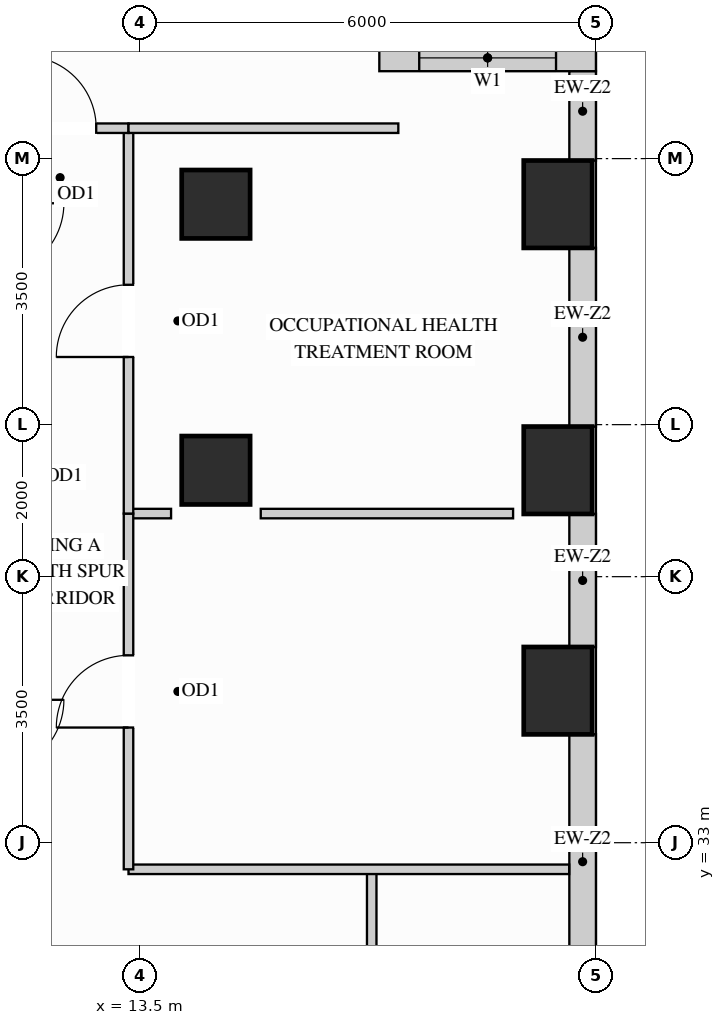
"""IFC4 building model, lengths in metres.
Left out: names, types, materials, properties, quantities, classifications, styles, units other than length and angle.
Written with IfcOpenShell. Run it as: python <this file> out.ifc"""

import sys

from ifc_helpers import new_model, si_unit, direction, frame, frame_2d, origin, origin_2d, place, context, subcontext, project, spatial, rectangle, extrude, source, transform, mapped, element, fill, save


model = new_model("IFC4")
c1 = context("Model", 3, precision=1e-05, world=origin(), true_north=direction((0.0, 1.0)))
c2 = subcontext(c1, "Body", "Model", "MODEL_VIEW")
j1 = project(units=[si_unit("LENGTHUNIT", "METRE"), si_unit("PLANEANGLEUNIT", "RADIAN")], contexts=[c1])
p1 = place(None, origin())
s1 = spatial("IfcSite", under=j1, at=p1, CompositionType="ELEMENT")
p2 = place(p1, origin())
s2 = spatial("IfcBuilding", under=s1, at=p2, CompositionType="ELEMENT")
p3 = place(p2, frame((0.0, 0.0, 91.8)))
s3 = spatial("IfcBuildingStorey", under=s2, at=p3, CompositionType="ELEMENT", Elevation=91.8)
m1 = source(origin(), c2, "Body", "SweptSolid", [
    extrude(rectangle(XDim=0.9, YDim=0.9, at=origin_2d()), origin(), (0.0, 0.0, 1.0), 3.38),
])
for number, where, z_axis, x_axis in (
    (1, (14.5, 37.9, 0.0), (0.0, 0.0, 1.0), (1.0, 0.0, 0.0)),
    (2, (14.5, 41.4, 0.0), (0.0, 0.0, 1.0), (1.0, 0.0, 0.0)),
):
    element("IfcColumn", number, at=place(p3, frame(where, z_axis=z_axis, x_axis=x_axis)), inside=s3, PredefinedType="COLUMN", context=c2, shape_type="MappedRepresentation", body=[
        mapped(m1, transform((0.0, 0.0, 0.0), x_axis=(1.0, 0.0, 0.0), y_axis=(0.0, 1.0, 0.0), z_axis=(0.0, 0.0, 1.0))),
    ])
m2 = source(origin(), c2, "Body", "SweptSolid", [
    extrude(rectangle(XDim=0.9, YDim=1.15, at=origin_2d()), origin(), (0.0, 0.0, 1.0), 3.38),
])
for number, where, z_axis, x_axis in (
    (3, (19.0, 35.0, 0.0), (0.0, 0.0, 1.0), (1.0, 0.0, 0.0)),
    (4, (19.0, 37.9, 0.0), (0.0, 0.0, 1.0), (1.0, 0.0, 0.0)),
    (5, (19.0, 41.4, 0.0), (0.0, 0.0, 1.0), (1.0, 0.0, 0.0)),
):
    element("IfcColumn", number, at=place(p3, frame(where, z_axis=z_axis, x_axis=x_axis)), inside=s3, PredefinedType="COLUMN", context=c2, shape_type="MappedRepresentation", body=[
        mapped(m2, transform((0.0, 0.0, 0.0), x_axis=(1.0, 0.0, 0.0), y_axis=(0.0, 1.0, 0.0), z_axis=(0.0, 0.0, 1.0))),
    ])
m3 = source(origin(), c2, "Body", "SweptSolid", [
    extrude(rectangle(XDim=3.354, YDim=0.35, at=frame_2d((1.677, 0.0))), origin(), (0.0, 0.0, 1.0), 2.519),
])
p4 = place(p3, frame((19.325, 31.073, 0.0), z_axis=(0.0, 0.0, 1.0), x_axis=(0.0, 1.0, 0.0)))
e6 = element("IfcWall", 6, at=p4, inside=s3, PredefinedType="SOLIDWALL", context=c2, shape_type="MappedRepresentation", body=[
    mapped(m3, transform((0.0, 0.0, 0.0), x_axis=(1.0, 0.0, 0.0), y_axis=(0.0, 1.0, 0.0), z_axis=(0.0, 0.0, 1.0))),
])
m4 = source(origin(), c2, "Body", "SweptSolid", [
    extrude(rectangle(XDim=1.754, YDim=0.35, at=frame_2d((0.877, 0.0))), origin(), (0.0, 0.0, 1.0), 2.519),
])
p5 = place(p3, frame((19.325, 35.573, 0.0), z_axis=(0.0, 0.0, 1.0), x_axis=(0.0, 1.0, 0.0)))
e7 = element("IfcWall", 7, at=p5, inside=s3, PredefinedType="SOLIDWALL", context=c2, shape_type="MappedRepresentation", body=[
    mapped(m4, transform((0.0, 0.0, 0.0), x_axis=(1.0, 0.0, 0.0), y_axis=(0.0, 1.0, 0.0), z_axis=(0.0, 0.0, 1.0))),
])
m5 = source(origin(), c2, "Body", "SweptSolid", [
    extrude(rectangle(XDim=2.354, YDim=0.35, at=frame_2d((1.177, 0.0))), origin(), (0.0, 0.0, 1.0), 2.519),
])
p6 = place(p3, frame((19.325, 38.473, 0.0), z_axis=(0.0, 0.0, 1.0), x_axis=(0.0, 1.0, 0.0)))
e8 = element("IfcWall", 8, at=p6, inside=s3, PredefinedType="SOLIDWALL", context=c2, shape_type="MappedRepresentation", body=[
    mapped(m5, transform((0.0, 0.0, 0.0), x_axis=(1.0, 0.0, 0.0), y_axis=(0.0, 1.0, 0.0), z_axis=(0.0, 0.0, 1.0))),
])
m6 = source(origin(), c2, "Body", "SweptSolid", [
    extrude(rectangle(XDim=1.179, YDim=0.35, at=frame_2d((0.59, 0.0))), origin(), (0.0, 0.0, 1.0), 3.365),
])
p7 = place(p3, frame((19.325, 41.973, 0.0), z_axis=(0.0, 0.0, 1.0), x_axis=(0.0, 1.0, 0.0)))
e9 = element("IfcWall", 9, at=p7, inside=s3, PredefinedType="SOLIDWALL", context=c2, shape_type="MappedRepresentation", body=[
    mapped(m6, transform((0.0, 0.0, 0.0), x_axis=(1.0, 0.0, 0.0), y_axis=(0.0, 1.0, 0.0), z_axis=(0.0, 0.0, 1.0))),
])
p8 = place(p3, frame((19.5, 43.325, 0.0), z_axis=(0.0, 0.0, 1.0), x_axis=(-1.0, 0.0, 0.0)))
e10 = element("IfcWall", 10, at=p8, inside=s3, PredefinedType="SOLIDWALL", context=c2, shape_type="SweptSolid", body=[
    extrude(rectangle(XDim=2.85, YDim=0.35, at=frame_2d((1.425, 0.0))), origin(), (0.0, 0.0, 1.0), 3.365),
])
p9 = place(p8, frame((0.525, 0.0, 0.78)))
e11 = element("IfcOpeningElement", 11, at=p9, cuts=e10, PredefinedType="OPENING", context=c2, shape_type="SweptSolid", body=[
    extrude(rectangle(XDim=1.8, YDim=2.1, at=frame_2d((0.9, 1.05))), frame((0.0, 0.185, 0.0), z_axis=(0.0, -1.0, 0.0), x_axis=(1.0, 0.0, 0.0)), (0.0, 0.0, 1.0), 0.37),
])
p10 = place(p3, frame((16.55, 26.05, 0.0), z_axis=(0.0, 0.0, 1.0), x_axis=(0.0, 1.0, 0.0)))
e12 = element("IfcWall", 12, at=p10, inside=s3, PredefinedType="PARTITIONING", context=c2, shape_type="SweptSolid", body=[
    extrude(rectangle(XDim=6.6, YDim=0.125, at=frame_2d((3.3, 0.0))), origin(), (0.0, 0.0, 1.0), 3.365),
])
p11 = place(p10, frame((2.825, 0.0, 0.0)))
e13 = element("IfcOpeningElement", 13, at=p11, cuts=e12, PredefinedType="OPENING", context=c2, shape_type="SweptSolid", body=[
    extrude(rectangle(XDim=0.95, YDim=2.15, at=frame_2d((0.475, 1.075))), frame((0.0, 0.073, 0.0), z_axis=(0.0, -1.0, 0.0), x_axis=(1.0, 0.0, 0.0)), (0.0, 0.0, 1.0), 0.145),
])
m7 = source(origin(), c2, "Body", "SweptSolid", [
    extrude(rectangle(XDim=0.56, YDim=0.125, at=frame_2d((0.28, 0.0))), origin(), (0.0, 0.0, 1.0), 3.365),
])
p12 = place(p3, frame((13.35, 37.33, 0.0), z_axis=(0.0, 0.0, 1.0), x_axis=(1.0, 0.0, 0.0)))
e14 = element("IfcWall", 14, at=p12, inside=s3, PredefinedType="PARTITIONING", context=c2, shape_type="MappedRepresentation", body=[
    mapped(m7, transform((0.0, 0.0, 0.0), x_axis=(1.0, 0.0, 0.0), y_axis=(0.0, 1.0, 0.0), z_axis=(0.0, 0.0, 1.0))),
])
m8 = source(origin(), c2, "Body", "SweptSolid", [
    extrude(rectangle(XDim=3.32, YDim=0.125, at=frame_2d((1.66, 0.0))), origin(), (0.0, 0.0, 1.0), 3.365),
])
p13 = place(p3, frame((15.09, 37.33, 0.0), z_axis=(0.0, 0.0, 1.0), x_axis=(1.0, 0.0, 0.0)))
e15 = element("IfcWall", 15, at=p13, inside=s3, PredefinedType="PARTITIONING", context=c2, shape_type="MappedRepresentation", body=[
    mapped(m8, transform((0.0, 0.0, 0.0), x_axis=(1.0, 0.0, 0.0), y_axis=(0.0, 1.0, 0.0), z_axis=(0.0, 0.0, 1.0))),
])
m9 = source(origin(), c2, "Body", "SweptSolid", [
    extrude(rectangle(XDim=5.798, YDim=0.125, at=frame_2d((2.899, 0.0))), origin(), (0.0, 0.0, 1.0), 3.365),
])
p14 = place(p3, frame((13.35, 32.65, 0.0), z_axis=(0.0, 0.0, 1.0), x_axis=(1.0, 0.0, 0.0)))
e16 = element("IfcWall", 16, at=p14, inside=s3, PredefinedType="PARTITIONING", context=c2, shape_type="MappedRepresentation", body=[
    mapped(m9, transform((0.0, 0.0, 0.0), x_axis=(1.0, 0.0, 0.0), y_axis=(0.0, 1.0, 0.0), z_axis=(0.0, 0.0, 1.0))),
])
p15 = place(p3, frame((13.35, 32.65, 0.0), z_axis=(0.0, 0.0, 1.0), x_axis=(0.0, 1.0, 0.0)))
e17 = element("IfcWall", 17, at=p15, inside=s3, PredefinedType="PARTITIONING", context=c2, shape_type="SweptSolid", body=[
    extrude(rectangle(XDim=4.68, YDim=0.125, at=frame_2d((2.34, 0.0))), origin(), (0.0, 0.0, 1.0), 3.365),
])
p16 = place(p15, frame((1.865, 0.0, 0.0)))
e18 = element("IfcOpeningElement", 18, at=p16, cuts=e17, PredefinedType="OPENING", context=c2, shape_type="SweptSolid", body=[
    extrude(rectangle(XDim=0.95, YDim=2.15, at=frame_2d((0.475, 1.075))), frame((0.0, 0.073, 0.0), z_axis=(0.0, -1.0, 0.0), x_axis=(1.0, 0.0, 0.0)), (0.0, 0.0, 1.0), 0.145),
])
p17 = place(p3, frame((13.35, 37.33, 0.0), z_axis=(0.0, 0.0, 1.0), x_axis=(0.0, 1.0, 0.0)))
e19 = element("IfcWall", 19, at=p17, inside=s3, PredefinedType="PARTITIONING", context=c2, shape_type="SweptSolid", body=[
    extrude(rectangle(XDim=5.07, YDim=0.125, at=frame_2d((2.535, 0.0))), origin(), (0.0, 0.0, 1.0), 3.365),
])
p18 = place(p17, frame((2.06, 0.0, 0.0)))
e20 = element("IfcOpeningElement", 20, at=p18, cuts=e19, PredefinedType="OPENING", context=c2, shape_type="SweptSolid", body=[
    extrude(rectangle(XDim=0.95, YDim=2.15, at=frame_2d((0.475, 1.075))), frame((0.0, 0.073, 0.0), z_axis=(0.0, -1.0, 0.0), x_axis=(1.0, 0.0, 0.0)), (0.0, 0.0, 1.0), 0.145),
])
p19 = place(p3, frame((11.55, 42.4, 0.0), z_axis=(0.0, 0.0, 1.0), x_axis=(1.0, 0.0, 0.0)))
e21 = element("IfcWall", 21, at=p19, inside=s3, PredefinedType="PARTITIONING", context=c2, shape_type="SweptSolid", body=[
    extrude(rectangle(XDim=1.8, YDim=0.125, at=frame_2d((0.9, 0.0))), origin(), (0.0, 0.0, 1.0), 3.365),
])
p20 = place(p19, frame((0.425, 0.0, 0.0)))
e22 = element("IfcOpeningElement", 22, at=p20, cuts=e21, PredefinedType="OPENING", context=c2, shape_type="SweptSolid", body=[
    extrude(rectangle(XDim=0.95, YDim=2.15, at=frame_2d((0.475, 1.075))), frame((0.0, 0.073, 0.0), z_axis=(0.0, -1.0, 0.0), x_axis=(1.0, 0.0, 0.0)), (0.0, 0.0, 1.0), 0.145),
])
m10 = source(origin(), c2, "Body", "SweptSolid", [
    extrude(rectangle(XDim=3.55, YDim=0.125, at=frame_2d((1.775, 0.0))), origin(), (0.0, 0.0, 1.0), 3.365),
])
p21 = place(p3, frame((13.35, 42.4, 0.0), z_axis=(0.0, 0.0, 1.0), x_axis=(1.0, 0.0, 0.0)))
e23 = element("IfcWall", 23, at=p21, inside=s3, PredefinedType="PARTITIONING", context=c2, shape_type="MappedRepresentation", body=[
    mapped(m10, transform((0.0, 0.0, 0.0), x_axis=(1.0, 0.0, 0.0), y_axis=(0.0, 1.0, 0.0), z_axis=(0.0, 0.0, 1.0))),
])
m11 = source(origin(), c2, "Body", "SweptSolid", [
    extrude(rectangle(XDim=0.95, YDim=2.15, at=frame_2d((0.475, 1.075))), frame((0.0, 0.025, 0.0), z_axis=(0.0, -1.0, 0.0), x_axis=(1.0, 0.0, 0.0)), (0.0, 0.0, 1.0), 0.05),
])
p22 = place(p16, origin())
e24 = element("IfcDoor", 24, at=p22, inside=s3, OperationType="SINGLE_SWING_LEFT", PredefinedType="DOOR", context=c2, shape_type="MappedRepresentation", body=[
    mapped(m11, transform((0.0, 0.0, 0.0), x_axis=(1.0, 0.0, 0.0), y_axis=(0.0, 1.0, 0.0), z_axis=(0.0, 0.0, 1.0))),
])
fill(e18, e24)
p23 = place(p18, origin())
e25 = element("IfcDoor", 25, at=p23, inside=s3, OperationType="SINGLE_SWING_LEFT", PredefinedType="DOOR", context=c2, shape_type="MappedRepresentation", body=[
    mapped(m11, transform((0.0, 0.0, 0.0), x_axis=(1.0, 0.0, 0.0), y_axis=(0.0, 1.0, 0.0), z_axis=(0.0, 0.0, 1.0))),
])
fill(e20, e25)
p24 = place(p20, origin())
e26 = element("IfcDoor", 26, at=p24, inside=s3, OperationType="SINGLE_SWING_LEFT", PredefinedType="DOOR", context=c2, shape_type="MappedRepresentation", body=[
    mapped(m11, transform((0.0, 0.0, 0.0), x_axis=(1.0, 0.0, 0.0), y_axis=(0.0, 1.0, 0.0), z_axis=(0.0, 0.0, 1.0))),
])
fill(e22, e26)
m12 = source(origin(), c2, "Body", "SweptSolid", [
    extrude(rectangle(XDim=1.8, YDim=2.1, at=frame_2d((0.9, 1.05))), frame((0.0, 0.03, 0.0), z_axis=(0.0, -1.0, 0.0), x_axis=(1.0, 0.0, 0.0)), (0.0, 0.0, 1.0), 0.06),
])
p25 = place(p9, origin())
e27 = element("IfcWindow", 27, at=p25, inside=s3, PartitioningType="SINGLE_PANEL", PredefinedType="WINDOW", context=c2, shape_type="MappedRepresentation", body=[
    mapped(m12, transform((0.0, 0.0, 0.0), x_axis=(1.0, 0.0, 0.0), y_axis=(0.0, 1.0, 0.0), z_axis=(0.0, 0.0, 1.0))),
])
fill(e11, e27)
save(model, sys.argv[1])
